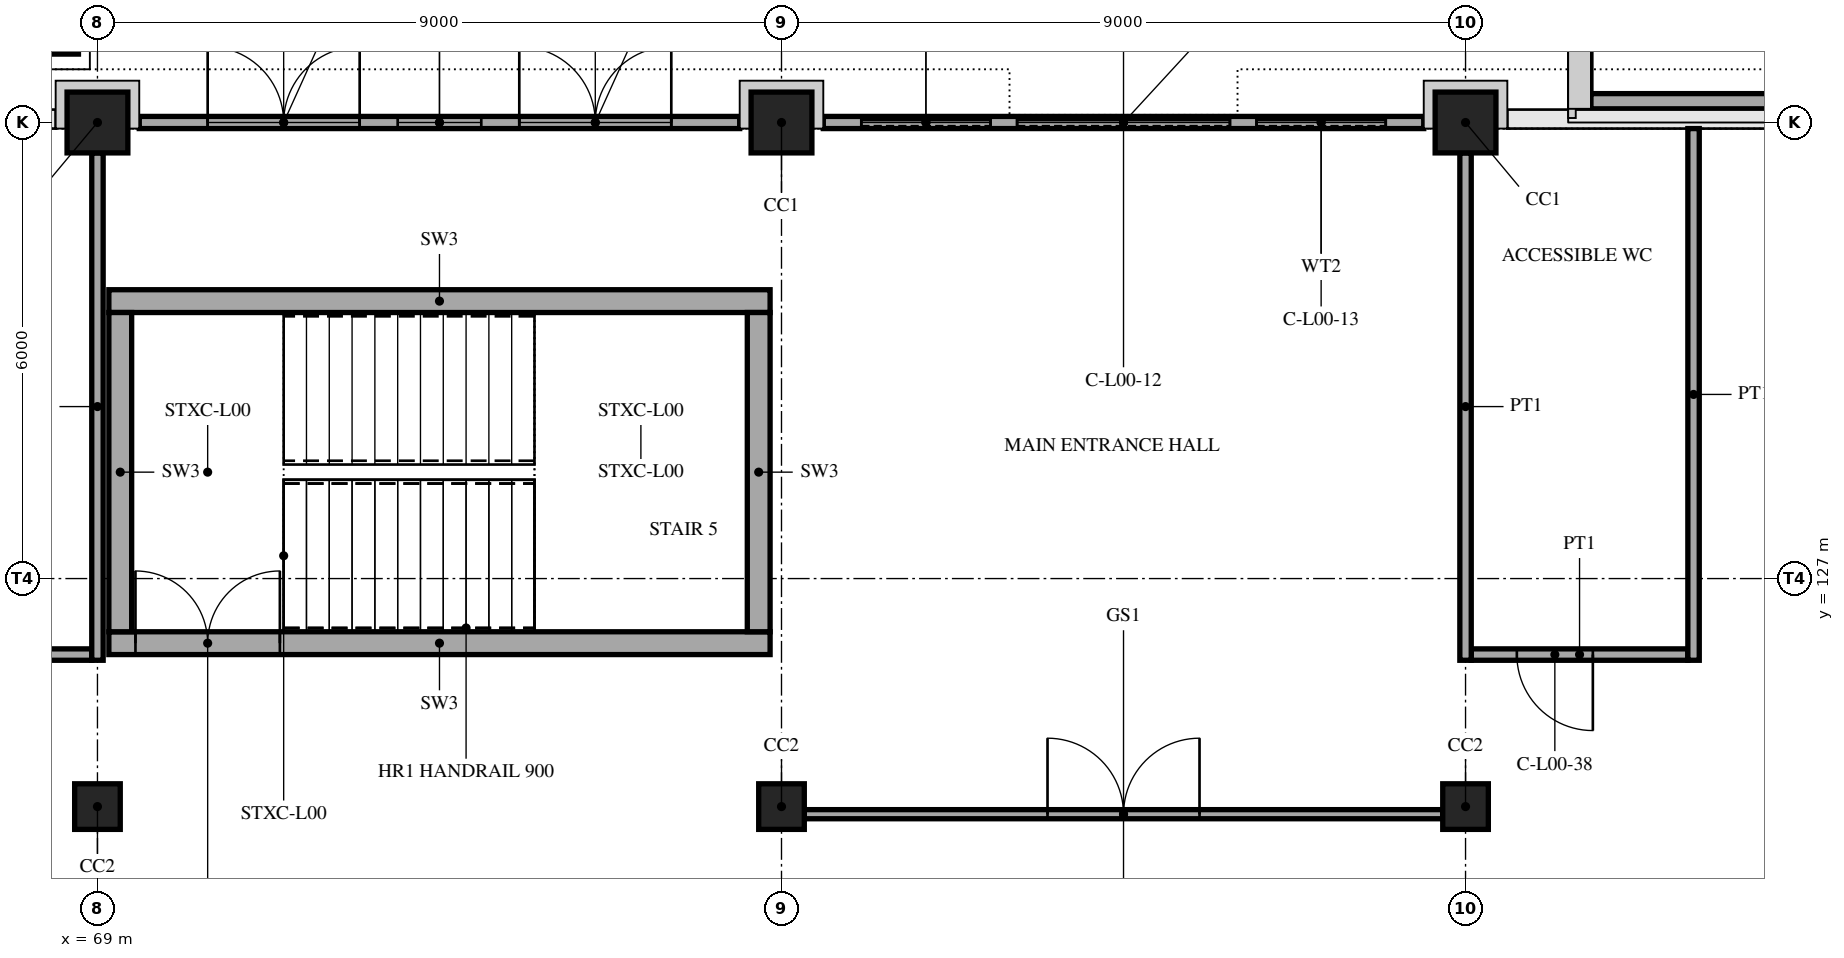
"""IFC4 building model, lengths in metres.
Left out: names, types, materials, properties, quantities, classifications, styles, units other than length and angle.
Written with IfcOpenShell. Run it as: python <this file> out.ifc"""

import sys

from ifc_helpers import new_model, si_unit, direction, frame, frame_2d, origin, origin_2d, place, context, subcontext, project, spatial, rectangle, extrude, element, fill, save


model = new_model("IFC4")
c1 = context("Model", 3, precision=1e-05, world=origin(), true_north=direction((0.0, 1.0)))
c2 = subcontext(c1, "Body", "Model", "MODEL_VIEW")
j1 = project(units=[si_unit("LENGTHUNIT", "METRE"), si_unit("PLANEANGLEUNIT", "RADIAN")], contexts=[c1])
p1 = place(None, origin())
s1 = spatial("IfcSite", under=j1, at=p1, CompositionType="ELEMENT")
p2 = place(p1, origin())
s2 = spatial("IfcBuilding", under=s1, at=p2, CompositionType="ELEMENT")
p3 = place(p2, origin())
s3 = spatial("IfcBuildingStorey", under=s2, at=p3, CompositionType="ELEMENT", Elevation=0.0)
p4 = place(p3, frame((69.0, 124.0, 0.0), z_axis=(0.0, 0.0, 1.0), x_axis=(1.0, 0.0, 0.0)))
e1 = element("IfcColumn", 1, at=p4, inside=s3, PredefinedType="COLUMN", context=c2, shape_type="SweptSolid", body=[
    extrude(rectangle(XDim=0.6, YDim=0.6, at=origin_2d()), origin(), (0.0, 0.0, 1.0), 5.0),
])
p5 = place(p3, frame((69.0, 133.0, 0.0), z_axis=(0.0, 0.0, 1.0), x_axis=(1.0, 0.0, 0.0)))
e2 = element("IfcColumn", 2, at=p5, inside=s3, PredefinedType="COLUMN", context=c2, shape_type="SweptSolid", body=[
    extrude(rectangle(XDim=0.8, YDim=0.8, at=origin_2d()), origin(), (0.0, 0.0, 1.0), 5.0),
])
p6 = place(p3, frame((78.0, 124.0, 0.0), z_axis=(0.0, 0.0, 1.0), x_axis=(1.0, 0.0, 0.0)))
e3 = element("IfcColumn", 3, at=p6, inside=s3, PredefinedType="COLUMN", context=c2, shape_type="SweptSolid", body=[
    extrude(rectangle(XDim=0.6, YDim=0.6, at=origin_2d()), origin(), (0.0, 0.0, 1.0), 5.0),
])
p7 = place(p3, frame((78.0, 133.0, 0.0), z_axis=(0.0, 0.0, 1.0), x_axis=(1.0, 0.0, 0.0)))
e4 = element("IfcColumn", 4, at=p7, inside=s3, PredefinedType="COLUMN", context=c2, shape_type="SweptSolid", body=[
    extrude(rectangle(XDim=0.8, YDim=0.8, at=origin_2d()), origin(), (0.0, 0.0, 1.0), 5.0),
])
p8 = place(p3, frame((87.0, 124.0, 0.0), z_axis=(0.0, 0.0, 1.0), x_axis=(1.0, 0.0, 0.0)))
e5 = element("IfcColumn", 5, at=p8, inside=s3, PredefinedType="COLUMN", context=c2, shape_type="SweptSolid", body=[
    extrude(rectangle(XDim=0.6, YDim=0.6, at=origin_2d()), origin(), (0.0, 0.0, 1.0), 5.0),
])
p9 = place(p3, frame((87.0, 133.0, 0.0), z_axis=(0.0, 0.0, 1.0), x_axis=(1.0, 0.0, 0.0)))
e6 = element("IfcColumn", 6, at=p9, inside=s3, PredefinedType="COLUMN", context=c2, shape_type="SweptSolid", body=[
    extrude(rectangle(XDim=0.8, YDim=0.8, at=origin_2d()), origin(), (0.0, 0.0, 1.0), 5.0),
])
p10 = place(p3, frame((69.15, 126.15, 0.0), z_axis=(0.0, 0.0, 1.0), x_axis=(1.0, 0.0, 0.0)))
e7 = element("IfcWall", 7, at=p10, inside=s3, PredefinedType="SHEAR", context=c2, shape_type="SweptSolid", body=[
    extrude(rectangle(XDim=8.7, YDim=0.3, at=frame_2d((4.35, 0.0))), origin(), (0.0, 0.0, 1.0), 5.0),
])
p11 = place(p10, frame((0.35, 0.0, 0.0)))
e8 = element("IfcOpeningElement", 8, at=p11, cuts=e7, PredefinedType="OPENING", context=c2, shape_type="SweptSolid", body=[
    extrude(rectangle(XDim=1.9, YDim=2.1, at=frame_2d((0.95, 1.05))), frame((0.0, 0.16, 0.0), z_axis=(0.0, -1.0, 0.0), x_axis=(1.0, 0.0, 0.0)), (0.0, 0.0, 1.0), 0.32),
])
p12 = place(p3, frame((69.15, 130.65, 0.0), z_axis=(0.0, 0.0, 1.0), x_axis=(1.0, 0.0, 0.0)))
e9 = element("IfcWall", 9, at=p12, inside=s3, PredefinedType="SHEAR", context=c2, shape_type="SweptSolid", body=[
    extrude(rectangle(XDim=8.7, YDim=0.3, at=frame_2d((4.35, 0.0))), origin(), (0.0, 0.0, 1.0), 5.0),
])
for number, where, z_axis, x_axis in (
    (10, (69.3, 126.3, 0.0), (0.0, 0.0, 1.0), (0.0, 1.0, 0.0)),
    (11, (77.7, 126.3, 0.0), (0.0, 0.0, 1.0), (0.0, 1.0, 0.0)),
):
    element("IfcWall", number, at=place(p3, frame(where, z_axis=z_axis, x_axis=x_axis)), inside=s3, PredefinedType="SHEAR", context=c2, shape_type="SweptSolid", body=[
        extrude(rectangle(XDim=4.2, YDim=0.3, at=frame_2d((2.1, 0.0))), origin(), (0.0, 0.0, 1.0), 5.0),
    ])
p13 = place(p3, frame((88.55, 133.059, 0.0), z_axis=(0.0, 0.0, 1.0), x_axis=(0.0, 1.0, 0.0)))
e12 = element("IfcWall", 12, at=p13, inside=s3, PredefinedType="SOLIDWALL", context=c2, shape_type="SweptSolid", body=[
    extrude(rectangle(XDim=1.871, YDim=0.2, at=frame_2d((0.936, 0.0))), origin(), (0.0, 0.0, 1.0), 3.2),
])
p14 = place(p3, frame((94.35, 133.28, 0.0), z_axis=(0.0, 0.0, 1.0), x_axis=(-1.0, 0.0, 0.0)))
e13 = element("IfcWall", 13, at=p14, inside=s3, PredefinedType="SOLIDWALL", context=c2, shape_type="SweptSolid", body=[
    extrude(rectangle(XDim=5.7, YDim=0.2, at=frame_2d((2.85, 0.0))), origin(), (0.0, 0.0, 1.0), 3.2),
])
p15 = place(p3, frame((69.55, 133.0, 0.0), z_axis=(0.0, 0.0, 1.0), x_axis=(1.0, 0.0, 0.0)))
e14 = element("IfcWall", 14, at=p15, inside=s3, PredefinedType="STANDARD", context=c2, shape_type="SweptSolid", body=[
    extrude(rectangle(XDim=7.9, YDim=0.16, at=frame_2d((3.95, 0.0))), origin(), (0.0, 0.0, 1.0), 5.0),
])
p16 = place(p15, frame((0.9, 0.0, 0.0)))
e15 = element("IfcOpeningElement", 15, at=p16, cuts=e14, PredefinedType="OPENING", context=c2, shape_type="SweptSolid", body=[
    extrude(rectangle(XDim=2.0, YDim=2.4, at=frame_2d((1.0, 1.2))), frame((0.0, 0.09, 0.0), z_axis=(0.0, -1.0, 0.0), x_axis=(1.0, 0.0, 0.0)), (0.0, 0.0, 1.0), 0.18),
])
p17 = place(p15, frame((0.9, 0.0, 2.6)))
e16 = element("IfcOpeningElement", 16, at=p17, cuts=e14, PredefinedType="OPENING", context=c2, shape_type="SweptSolid", body=[
    extrude(rectangle(XDim=2.0, YDim=2.1, at=frame_2d((1.0, 1.05))), frame((0.0, 0.09, 0.0), z_axis=(0.0, -1.0, 0.0), x_axis=(1.0, 0.0, 0.0)), (0.0, 0.0, 1.0), 0.18),
])
p18 = place(p15, frame((5.0, 0.0, 0.0)))
e17 = element("IfcOpeningElement", 17, at=p18, cuts=e14, PredefinedType="OPENING", context=c2, shape_type="SweptSolid", body=[
    extrude(rectangle(XDim=2.0, YDim=2.4, at=frame_2d((1.0, 1.2))), frame((0.0, 0.09, 0.0), z_axis=(0.0, -1.0, 0.0), x_axis=(1.0, 0.0, 0.0)), (0.0, 0.0, 1.0), 0.18),
])
p19 = place(p15, frame((5.0, 0.0, 2.6)))
e18 = element("IfcOpeningElement", 18, at=p19, cuts=e14, PredefinedType="OPENING", context=c2, shape_type="SweptSolid", body=[
    extrude(rectangle(XDim=2.0, YDim=2.1, at=frame_2d((1.0, 1.05))), frame((0.0, 0.09, 0.0), z_axis=(0.0, -1.0, 0.0), x_axis=(1.0, 0.0, 0.0)), (0.0, 0.0, 1.0), 0.18),
])
p20 = place(p15, frame((3.4, 0.0, 0.9)))
e19 = element("IfcOpeningElement", 19, at=p20, cuts=e14, PredefinedType="OPENING", context=c2, shape_type="SweptSolid", body=[
    extrude(rectangle(XDim=1.1, YDim=3.8, at=frame_2d((0.55, 1.9))), frame((0.0, 0.09, 0.0), z_axis=(0.0, -1.0, 0.0), x_axis=(1.0, 0.0, 0.0)), (0.0, 0.0, 1.0), 0.18),
])
p21 = place(p3, frame((78.55, 133.0, 0.0), z_axis=(0.0, 0.0, 1.0), x_axis=(1.0, 0.0, 0.0)))
e20 = element("IfcWall", 20, at=p21, inside=s3, PredefinedType="STANDARD", context=c2, shape_type="SweptSolid", body=[
    extrude(rectangle(XDim=7.9, YDim=0.16, at=frame_2d((3.95, 0.0))), origin(), (0.0, 0.0, 1.0), 5.0),
])
p22 = place(p21, frame((0.5, 0.0, 0.0)))
e21 = element("IfcOpeningElement", 21, at=p22, cuts=e20, PredefinedType="OPENING", context=c2, shape_type="SweptSolid", body=[
    extrude(rectangle(XDim=1.7, YDim=2.4, at=frame_2d((0.85, 1.2))), frame((0.0, 0.09, 0.0), z_axis=(0.0, -1.0, 0.0), x_axis=(1.0, 0.0, 0.0)), (0.0, 0.0, 1.0), 0.18),
])
p23 = place(p21, frame((0.5, 0.0, 2.6)))
e22 = element("IfcOpeningElement", 22, at=p23, cuts=e20, PredefinedType="OPENING", context=c2, shape_type="SweptSolid", body=[
    extrude(rectangle(XDim=1.7, YDim=2.1, at=frame_2d((0.85, 1.05))), frame((0.0, 0.09, 0.0), z_axis=(0.0, -1.0, 0.0), x_axis=(1.0, 0.0, 0.0)), (0.0, 0.0, 1.0), 0.18),
])
p24 = place(p21, frame((2.55, 0.0, 0.0)))
e23 = element("IfcOpeningElement", 23, at=p24, cuts=e20, PredefinedType="OPENING", context=c2, shape_type="SweptSolid", body=[
    extrude(rectangle(XDim=2.8, YDim=2.4, at=frame_2d((1.4, 1.2))), frame((0.0, 0.09, 0.0), z_axis=(0.0, -1.0, 0.0), x_axis=(1.0, 0.0, 0.0)), (0.0, 0.0, 1.0), 0.18),
])
p25 = place(p21, frame((2.55, 0.0, 2.6)))
e24 = element("IfcOpeningElement", 24, at=p25, cuts=e20, PredefinedType="OPENING", context=c2, shape_type="SweptSolid", body=[
    extrude(rectangle(XDim=2.8, YDim=2.1, at=frame_2d((1.4, 1.05))), frame((0.0, 0.09, 0.0), z_axis=(0.0, -1.0, 0.0), x_axis=(1.0, 0.0, 0.0)), (0.0, 0.0, 1.0), 0.18),
])
p26 = place(p21, frame((5.7, 0.0, 0.0)))
e25 = element("IfcOpeningElement", 25, at=p26, cuts=e20, PredefinedType="OPENING", context=c2, shape_type="SweptSolid", body=[
    extrude(rectangle(XDim=1.7, YDim=2.4, at=frame_2d((0.85, 1.2))), frame((0.0, 0.09, 0.0), z_axis=(0.0, -1.0, 0.0), x_axis=(1.0, 0.0, 0.0)), (0.0, 0.0, 1.0), 0.18),
])
p27 = place(p21, frame((5.7, 0.0, 2.6)))
e26 = element("IfcOpeningElement", 26, at=p27, cuts=e20, PredefinedType="OPENING", context=c2, shape_type="SweptSolid", body=[
    extrude(rectangle(XDim=1.7, YDim=2.1, at=frame_2d((0.85, 1.05))), frame((0.0, 0.09, 0.0), z_axis=(0.0, -1.0, 0.0), x_axis=(1.0, 0.0, 0.0)), (0.0, 0.0, 1.0), 0.18),
])
p28 = place(p3, frame((60.25, 134.0, 0.0), z_axis=(0.0, 0.0, 1.0), x_axis=(1.0, 0.0, 0.0)))
e27 = element("IfcWall", 27, at=p28, inside=s3, PredefinedType="STANDARD", context=c2, shape_type="SweptSolid", body=[
    extrude(rectangle(XDim=8.5, YDim=0.2, at=frame_2d((4.25, 0.0))), origin(), (0.0, 0.0, 1.0), 4.05),
])
p29 = place(p3, frame((60.075, 126.0, 0.0), z_axis=(0.0, 0.0, 1.0), x_axis=(1.0, 0.0, 0.0)))
e28 = element("IfcWall", 28, at=p29, inside=s3, PredefinedType="PARTITIONING", context=c2, shape_type="SweptSolid", body=[
    extrude(rectangle(XDim=8.85, YDim=0.15, at=frame_2d((4.425, 0.0))), origin(), (0.0, 0.0, 1.0), 4.8),
])
p30 = place(p29, frame((0.6, 0.0, 0.0)))
e29 = element("IfcOpeningElement", 29, at=p30, cuts=e28, PredefinedType="OPENING", context=c2, shape_type="SweptSolid", body=[
    extrude(rectangle(XDim=1.0, YDim=2.1, at=frame_2d((0.5, 1.05))), frame((0.0, 0.085, 0.0), z_axis=(0.0, -1.0, 0.0), x_axis=(1.0, 0.0, 0.0)), (0.0, 0.0, 1.0), 0.17),
])
p31 = place(p3, frame((69.0, 125.925, 0.0), z_axis=(0.0, 0.0, 1.0), x_axis=(0.0, 1.0, 0.0)))
e30 = element("IfcWall", 30, at=p31, inside=s3, PredefinedType="PARTITIONING", context=c2, shape_type="SweptSolid", body=[
    extrude(rectangle(XDim=6.675, YDim=0.15, at=frame_2d((3.337, 0.0))), origin(), (0.0, 0.0, 1.0), 4.0),
])
p32 = place(p3, frame((87.075, 126.0, 0.0), z_axis=(0.0, 0.0, 1.0), x_axis=(1.0, 0.0, 0.0)))
e31 = element("IfcWall", 31, at=p32, inside=s3, PredefinedType="PARTITIONING", context=c2, shape_type="SweptSolid", body=[
    extrude(rectangle(XDim=2.85, YDim=0.15, at=frame_2d((1.425, 0.0))), origin(), (0.0, 0.0, 1.0), 4.8),
])
p33 = place(p32, frame((0.6, 0.0, 0.0)))
e32 = element("IfcOpeningElement", 32, at=p33, cuts=e31, PredefinedType="OPENING", context=c2, shape_type="SweptSolid", body=[
    extrude(rectangle(XDim=1.0, YDim=2.1, at=frame_2d((0.5, 1.05))), frame((0.0, 0.085, 0.0), z_axis=(0.0, -1.0, 0.0), x_axis=(1.0, 0.0, 0.0)), (0.0, 0.0, 1.0), 0.17),
])
p34 = place(p3, frame((87.0, 125.925, 0.0), z_axis=(0.0, 0.0, 1.0), x_axis=(0.0, 1.0, 0.0)))
e33 = element("IfcWall", 33, at=p34, inside=s3, PredefinedType="PARTITIONING", context=c2, shape_type="SweptSolid", body=[
    extrude(rectangle(XDim=6.675, YDim=0.15, at=frame_2d((3.337, 0.0))), origin(), (0.0, 0.0, 1.0), 4.0),
])
p35 = place(p3, frame((90.0, 125.925, 0.0), z_axis=(0.0, 0.0, 1.0), x_axis=(0.0, 1.0, 0.0)))
e34 = element("IfcWall", 34, at=p35, inside=s3, PredefinedType="PARTITIONING", context=c2, shape_type="SweptSolid", body=[
    extrude(rectangle(XDim=6.995, YDim=0.15, at=frame_2d((3.498, 0.0))), origin(), (0.0, 0.0, 1.0), 4.8),
])
p36 = place(p3, frame((78.3, 123.9, 0.0), z_axis=(0.0, 0.0, 1.0), x_axis=(1.0, 0.0, 0.0)))
e35 = element("IfcWall", 35, at=p36, inside=s3, PredefinedType="PARTITIONING", context=c2, shape_type="SweptSolid", body=[
    extrude(rectangle(XDim=8.4, YDim=0.12, at=frame_2d((4.2, 0.0))), origin(), (0.0, 0.0, 1.0), 4.0),
])
p37 = place(p36, frame((3.2, 0.0, 0.0)))
e36 = element("IfcOpeningElement", 36, at=p37, cuts=e35, PredefinedType="OPENING", context=c2, shape_type="SweptSolid", body=[
    extrude(rectangle(XDim=2.0, YDim=2.4, at=frame_2d((1.0, 1.2))), frame((0.0, 0.07, 0.0), z_axis=(0.0, -1.0, 0.0), x_axis=(1.0, 0.0, 0.0)), (0.0, 0.0, 1.0), 0.14),
])
p38 = place(p16, origin())
e37 = element("IfcDoor", 37, at=p38, inside=s3, OperationType="DOUBLE_DOOR_SINGLE_SWING", PredefinedType="NOTDEFINED", context=c2, shape_type="SweptSolid", body=[
    extrude(rectangle(XDim=2.0, YDim=2.4, at=frame_2d((1.0, 1.2))), frame((0.0, 0.025, 0.0), z_axis=(0.0, -1.0, 0.0), x_axis=(1.0, 0.0, 0.0)), (0.0, 0.0, 1.0), 0.05),
])
fill(e15, e37)
p39 = place(p17, origin())
e38 = element("IfcWindow", 38, at=p39, inside=s3, PartitioningType="SINGLE_PANEL", PredefinedType="WINDOW", context=c2, shape_type="SweptSolid", body=[
    extrude(rectangle(XDim=2.0, YDim=2.1, at=frame_2d((1.0, 1.05))), frame((0.0, 0.03, 0.0), z_axis=(0.0, -1.0, 0.0), x_axis=(1.0, 0.0, 0.0)), (0.0, 0.0, 1.0), 0.06),
])
fill(e16, e38)
p40 = place(p18, origin())
e39 = element("IfcDoor", 39, at=p40, inside=s3, OperationType="DOUBLE_DOOR_SINGLE_SWING", PredefinedType="NOTDEFINED", context=c2, shape_type="SweptSolid", body=[
    extrude(rectangle(XDim=2.0, YDim=2.4, at=frame_2d((1.0, 1.2))), frame((0.0, 0.025, 0.0), z_axis=(0.0, -1.0, 0.0), x_axis=(1.0, 0.0, 0.0)), (0.0, 0.0, 1.0), 0.05),
])
fill(e17, e39)
p41 = place(p19, origin())
e40 = element("IfcWindow", 40, at=p41, inside=s3, PartitioningType="SINGLE_PANEL", PredefinedType="WINDOW", context=c2, shape_type="SweptSolid", body=[
    extrude(rectangle(XDim=2.0, YDim=2.1, at=frame_2d((1.0, 1.05))), frame((0.0, 0.03, 0.0), z_axis=(0.0, -1.0, 0.0), x_axis=(1.0, 0.0, 0.0)), (0.0, 0.0, 1.0), 0.06),
])
fill(e18, e40)
p42 = place(p20, origin())
e41 = element("IfcWindow", 41, at=p42, inside=s3, PartitioningType="SINGLE_PANEL", PredefinedType="WINDOW", context=c2, shape_type="SweptSolid", body=[
    extrude(rectangle(XDim=1.1, YDim=3.8, at=frame_2d((0.55, 1.9))), frame((0.0, 0.03, 0.0), z_axis=(0.0, -1.0, 0.0), x_axis=(1.0, 0.0, 0.0)), (0.0, 0.0, 1.0), 0.06),
])
fill(e19, e41)
p43 = place(p22, origin())
e42 = element("IfcDoor", 42, at=p43, inside=s3, OperationType="DOUBLE_DOOR_SLIDING", PredefinedType="NOTDEFINED", context=c2, shape_type="SweptSolid", body=[
    extrude(rectangle(XDim=1.7, YDim=2.4, at=frame_2d((0.85, 1.2))), frame((0.0, 0.025, 0.0), z_axis=(0.0, -1.0, 0.0), x_axis=(1.0, 0.0, 0.0)), (0.0, 0.0, 1.0), 0.05),
])
fill(e21, e42)
p44 = place(p23, origin())
e43 = element("IfcWindow", 43, at=p44, inside=s3, PartitioningType="SINGLE_PANEL", PredefinedType="WINDOW", context=c2, shape_type="SweptSolid", body=[
    extrude(rectangle(XDim=1.7, YDim=2.1, at=frame_2d((0.85, 1.05))), frame((0.0, 0.03, 0.0), z_axis=(0.0, -1.0, 0.0), x_axis=(1.0, 0.0, 0.0)), (0.0, 0.0, 1.0), 0.06),
])
fill(e22, e43)
p45 = place(p24, origin())
e44 = element("IfcDoor", 44, at=p45, inside=s3, OperationType="REVOLVING", PredefinedType="NOTDEFINED", context=c2, shape_type="SweptSolid", body=[
    extrude(rectangle(XDim=2.8, YDim=2.4, at=frame_2d((1.4, 1.2))), frame((0.0, 0.025, 0.0), z_axis=(0.0, -1.0, 0.0), x_axis=(1.0, 0.0, 0.0)), (0.0, 0.0, 1.0), 0.05),
])
fill(e23, e44)
p46 = place(p25, origin())
e45 = element("IfcWindow", 45, at=p46, inside=s3, PartitioningType="SINGLE_PANEL", PredefinedType="WINDOW", context=c2, shape_type="SweptSolid", body=[
    extrude(rectangle(XDim=2.8, YDim=2.1, at=frame_2d((1.4, 1.05))), frame((0.0, 0.03, 0.0), z_axis=(0.0, -1.0, 0.0), x_axis=(1.0, 0.0, 0.0)), (0.0, 0.0, 1.0), 0.06),
])
fill(e24, e45)
p47 = place(p26, origin())
e46 = element("IfcDoor", 46, at=p47, inside=s3, OperationType="DOUBLE_DOOR_SLIDING", PredefinedType="NOTDEFINED", context=c2, shape_type="SweptSolid", body=[
    extrude(rectangle(XDim=1.7, YDim=2.4, at=frame_2d((0.85, 1.2))), frame((0.0, 0.025, 0.0), z_axis=(0.0, -1.0, 0.0), x_axis=(1.0, 0.0, 0.0)), (0.0, 0.0, 1.0), 0.05),
])
fill(e25, e46)
p48 = place(p27, origin())
e47 = element("IfcWindow", 47, at=p48, inside=s3, PartitioningType="SINGLE_PANEL", PredefinedType="WINDOW", context=c2, shape_type="SweptSolid", body=[
    extrude(rectangle(XDim=1.7, YDim=2.1, at=frame_2d((0.85, 1.05))), frame((0.0, 0.03, 0.0), z_axis=(0.0, -1.0, 0.0), x_axis=(1.0, 0.0, 0.0)), (0.0, 0.0, 1.0), 0.06),
])
fill(e26, e47)
p49 = place(p11, origin())
e48 = element("IfcDoor", 48, at=p49, inside=s3, OperationType="DOUBLE_DOOR_SINGLE_SWING", PredefinedType="NOTDEFINED", context=c2, shape_type="SweptSolid", body=[
    extrude(rectangle(XDim=1.9, YDim=2.1, at=frame_2d((0.95, 1.05))), frame((0.0, 0.025, 0.0), z_axis=(0.0, -1.0, 0.0), x_axis=(1.0, 0.0, 0.0)), (0.0, 0.0, 1.0), 0.05),
])
fill(e8, e48)
p50 = place(p33, frame((1.0, 0.0, 0.0), z_axis=(0.0, 0.0, 1.0), x_axis=(-1.0, 0.0, 0.0)))
e49 = element("IfcDoor", 49, at=p50, inside=s3, OperationType="SINGLE_SWING_LEFT", PredefinedType="NOTDEFINED", context=c2, shape_type="SweptSolid", body=[
    extrude(rectangle(XDim=1.0, YDim=2.1, at=frame_2d((0.5, 1.05))), frame((0.0, 0.025, 0.0), z_axis=(0.0, -1.0, 0.0), x_axis=(1.0, 0.0, 0.0)), (0.0, 0.0, 1.0), 0.05),
])
fill(e32, e49)
p51 = place(p37, origin())
e50 = element("IfcDoor", 50, at=p51, inside=s3, OperationType="DOUBLE_DOOR_SINGLE_SWING", PredefinedType="NOTDEFINED", context=c2, shape_type="SweptSolid", body=[
    extrude(rectangle(XDim=2.0, YDim=2.4, at=frame_2d((1.0, 1.2))), frame((0.0, 0.025, 0.0), z_axis=(0.0, -1.0, 0.0), x_axis=(1.0, 0.0, 0.0)), (0.0, 0.0, 1.0), 0.05),
])
fill(e36, e50)
save(model, sys.argv[1])
